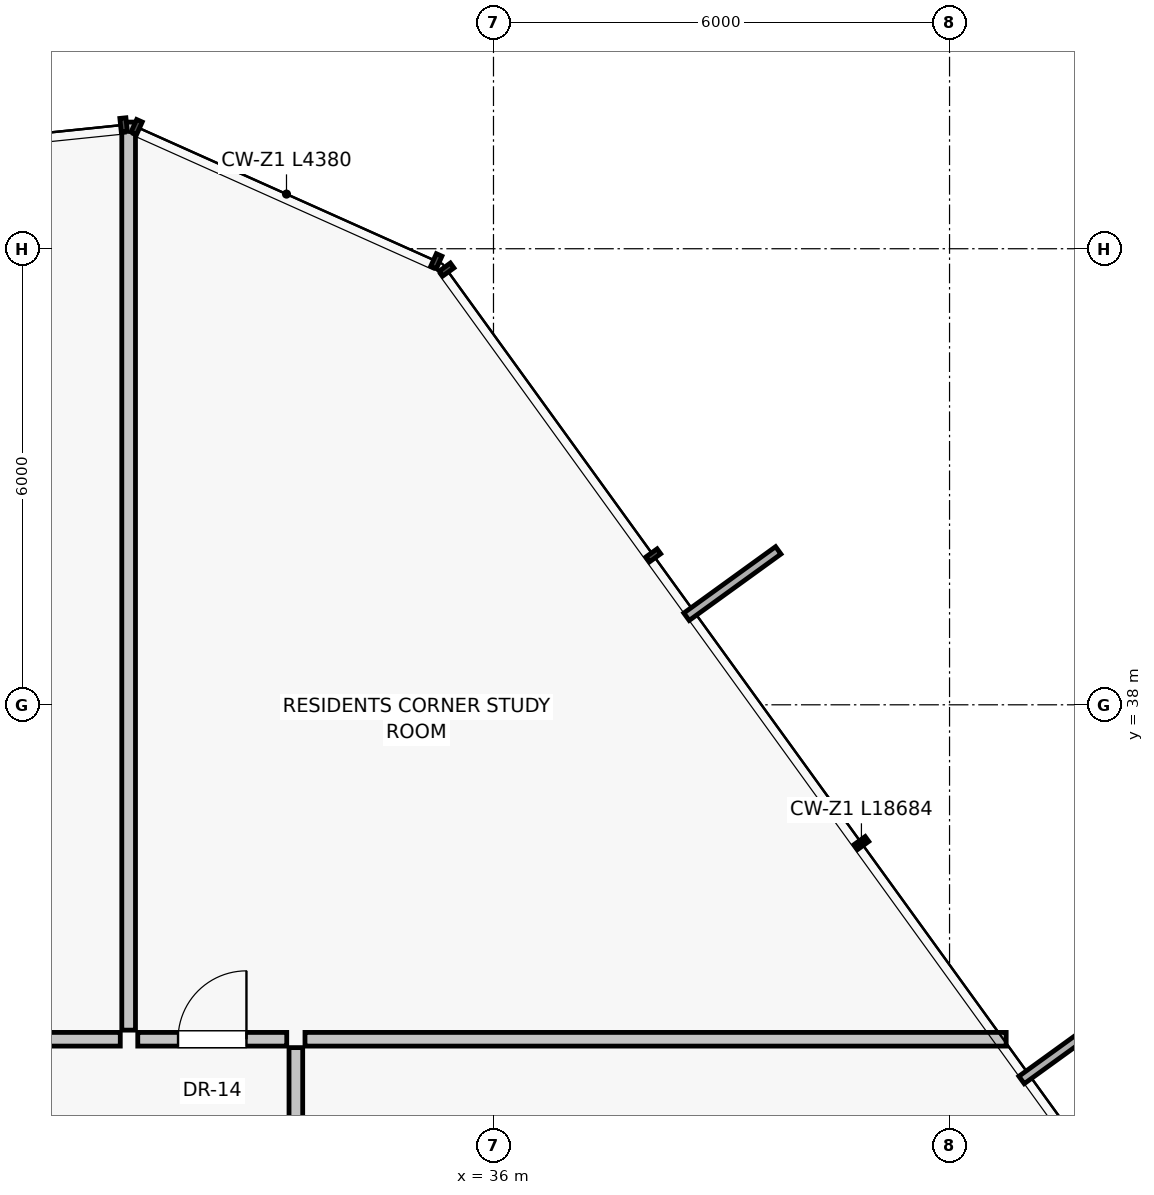
"""IFC4 building model, lengths in metres.
Left out: names, types, materials, properties, quantities, classifications, styles, units other than length and angle.
Written with IfcOpenShell. Run it as: python <this file> out.ifc"""

import sys

from ifc_helpers import new_model, si_unit, direction, frame, frame_2d, origin, place, context, subcontext, project, spatial, rectangle, extrude, source, transform, mapped, element, fill, save


model = new_model("IFC4")
c1 = context("Model", 3, precision=1e-05, world=origin(), true_north=direction((0.0, 1.0)))
c2 = subcontext(c1, "Body", "Model", "MODEL_VIEW")
j1 = project(units=[si_unit("LENGTHUNIT", "METRE"), si_unit("PLANEANGLEUNIT", "RADIAN")], contexts=[c1])
p1 = place(None, origin())
s1 = spatial("IfcSite", under=j1, at=p1, CompositionType="ELEMENT")
p2 = place(p1, origin())
s2 = spatial("IfcBuilding", under=s1, at=p2, CompositionType="ELEMENT")
p3 = place(p2, frame((0.0, 0.0, 43.55)))
s3 = spatial("IfcBuildingStorey", under=s2, at=p3, CompositionType="ELEMENT", Elevation=43.55)
p4 = place(p3, frame((31.2, 33.72, 0.0), z_axis=(0.0, 0.0, 1.0), x_axis=(0.0, 1.0, 0.0)))
e1 = element("IfcWall", 1, at=p4, inside=s3, PredefinedType="PARTITIONING", context=c2, shape_type="SweptSolid", body=[
    extrude(rectangle(XDim=11.946, YDim=0.18, at=frame_2d((5.973, 0.0))), origin(), (0.0, 0.0, 1.0), 3.0),
])
p5 = place(p3, frame((25.868, 33.6, 0.0), z_axis=(0.0, 0.0, 1.0), x_axis=(1.0, 0.0, 0.0)))
e2 = element("IfcWall", 2, at=p5, inside=s3, PredefinedType="PARTITIONING", context=c2, shape_type="SweptSolid", body=[
    extrude(rectangle(XDim=5.222, YDim=0.18, at=frame_2d((2.611, 0.0))), origin(), (0.0, 0.0, 1.0), 3.0),
])
p6 = place(p5, frame((3.065, 0.0, 0.0)))
e3 = element("IfcOpeningElement", 3, at=p6, cuts=e2, PredefinedType="OPENING", context=c2, shape_type="SweptSolid", body=[
    extrude(rectangle(XDim=0.95, YDim=2.02, at=frame_2d((0.475, 1.01))), frame((0.0, 0.1, 0.0), z_axis=(0.0, -1.0, 0.0), x_axis=(1.0, 0.0, 0.0)), (0.0, 0.0, 1.0), 0.2),
])
p7 = place(p3, frame((33.52, 33.6, 0.0), z_axis=(0.0, 0.0, 1.0), x_axis=(1.0, 0.0, 0.0)))
e4 = element("IfcWall", 4, at=p7, inside=s3, PredefinedType="PARTITIONING", context=c2, shape_type="SweptSolid", body=[
    extrude(rectangle(XDim=9.225, YDim=0.18, at=frame_2d((4.613, 0.0))), origin(), (0.0, 0.0, 1.0), 3.0),
])
p8 = place(p3, frame((33.4, 29.325, 0.0), z_axis=(0.0, 0.0, 1.0), x_axis=(0.0, 1.0, 0.0)))
e5 = element("IfcWall", 5, at=p8, inside=s3, PredefinedType="PARTITIONING", context=c2, shape_type="SweptSolid", body=[
    extrude(rectangle(XDim=4.165, YDim=0.18, at=frame_2d((2.083, 0.0))), origin(), (0.0, 0.0, 1.0), 3.0),
])
p9 = place(p8, frame((1.583, 0.0, 0.0)))
e6 = element("IfcOpeningElement", 6, at=p9, cuts=e5, PredefinedType="OPENING", context=c2, shape_type="SweptSolid", body=[
    extrude(rectangle(XDim=1.0, YDim=2.01, at=frame_2d((0.5, 1.005))), frame((0.0, 0.1, 0.0), z_axis=(0.0, -1.0, 0.0), x_axis=(1.0, 0.0, 0.0)), (0.0, 0.0, 1.0), 0.2),
])
p10 = place(p3, frame((31.32, 33.6, 0.0), z_axis=(0.0, 0.0, 1.0), x_axis=(1.0, 0.0, 0.0)))
e7 = element("IfcWall", 7, at=p10, inside=s3, PredefinedType="PARTITIONING", context=c2, shape_type="SweptSolid", body=[
    extrude(rectangle(XDim=1.96, YDim=0.18, at=frame_2d((0.98, 0.0))), origin(), (0.0, 0.0, 1.0), 3.0),
])
p11 = place(p10, frame((0.53, 0.0, 0.0)))
e8 = element("IfcOpeningElement", 8, at=p11, cuts=e7, PredefinedType="OPENING", context=c2, shape_type="SweptSolid", body=[
    extrude(rectangle(XDim=0.9, YDim=2.01, at=frame_2d((0.45, 1.005))), frame((0.0, 0.1, 0.0), z_axis=(0.0, -1.0, 0.0), x_axis=(1.0, 0.0, 0.0)), (0.0, 0.0, 1.0), 0.2),
])
m1 = source(origin(), c2, "Body", "SweptSolid", [
    extrude(rectangle(XDim=0.9, YDim=2.01, at=frame_2d((0.45, 1.005))), frame((0.0, 0.025, 0.0), z_axis=(0.0, -1.0, 0.0), x_axis=(1.0, 0.0, 0.0)), (0.0, 0.0, 1.0), 0.05),
])
p12 = place(p11, origin())
e9 = element("IfcDoor", 9, at=p12, inside=s3, OperationType="SINGLE_SWING_RIGHT", PredefinedType="DOOR", context=c2, shape_type="MappedRepresentation", body=[
    mapped(m1, transform((0.0, 0.0, 0.0), scale=1.0)),
])
fill(e8, e9)
save(model, sys.argv[1])
